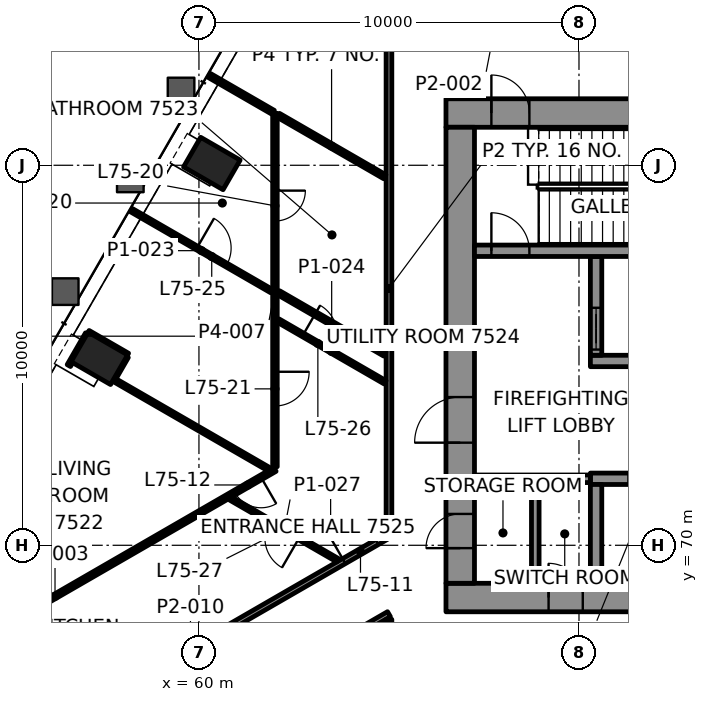
"""IFC4 building model, lengths in metres.
Left out: names, types, materials, properties, quantities, classifications, styles, units other than length and angle.
Written with IfcOpenShell. Run it as: python <this file> out.ifc"""

import sys

from ifc_helpers import new_model, si_unit, direction, frame, frame_2d, origin, origin_2d, place, context, subcontext, project, spatial, rectangle, hollow_rectangle, extrude, element, fill, save


model = new_model("IFC4")
c1 = context("Model", 3, precision=1e-05, world=origin(), true_north=direction((0.0, 1.0)))
c2 = subcontext(c1, "Body", "Model", "MODEL_VIEW")
j1 = project(units=[si_unit("LENGTHUNIT", "METRE"), si_unit("PLANEANGLEUNIT", "RADIAN")], contexts=[c1])
p1 = place(None, origin())
s1 = spatial("IfcSite", under=j1, at=p1, CompositionType="ELEMENT")
p2 = place(p1, origin())
s2 = spatial("IfcBuilding", under=s1, at=p2, CompositionType="ELEMENT")
p3 = place(p2, frame((0.0, 0.0, 309.1)))
s3 = spatial("IfcBuildingStorey", under=s2, at=p3, CompositionType="ELEMENT", Elevation=309.1)
for number, where, z_axis, x_axis in (
    (1, (60.339, 80.046, -0.0), (0.0, 0.0, 1.0), (-0.5, -0.866, 0.0)),
    (2, (57.379, 74.919, -0.0), (0.0, 0.0, 1.0), (-0.5, -0.866, 0.0)),
):
    element("IfcColumn", number, at=place(p3, frame(where, z_axis=z_axis, x_axis=x_axis)), inside=s3, PredefinedType="COLUMN", context=c2, shape_type="SweptSolid", body=[
        extrude(hollow_rectangle(XDim=0.9, YDim=1.2, WallThickness=0.06, at=origin_2d()), origin(), (0.0, 0.0, 1.0), 3.5),
    ])
p4 = place(p3, frame((66.5, 68.625, 0.0), z_axis=(0.0, 0.0, 1.0), x_axis=(1.0, 0.0, 0.0)))
e3 = element("IfcWall", 3, at=p4, inside=s3, PredefinedType="SHEAR", context=c2, shape_type="SweptSolid", body=[
    extrude(rectangle(XDim=17.0, YDim=0.75, at=frame_2d((8.5, 0.0))), origin(), (0.0, 0.0, 1.0), 3.3),
])
p5 = place(p4, frame((2.7, 0.0, 0.0)))
e4 = element("IfcOpeningElement", 4, at=p5, cuts=e3, PredefinedType="OPENING", context=c2, shape_type="SweptSolid", body=[
    extrude(rectangle(XDim=0.9, YDim=2.1, at=frame_2d((0.45, 1.05))), frame((0.0, 0.385, 0.0), z_axis=(0.0, -1.0, 0.0), x_axis=(1.0, 0.0, 0.0)), (0.0, 0.0, 1.0), 0.77),
])
p6 = place(p3, frame((66.5, 81.375, 0.0), z_axis=(0.0, 0.0, 1.0), x_axis=(1.0, 0.0, 0.0)))
e5 = element("IfcWall", 5, at=p6, inside=s3, PredefinedType="SHEAR", context=c2, shape_type="SweptSolid", body=[
    extrude(rectangle(XDim=17.0, YDim=0.75, at=frame_2d((8.5, 0.0))), origin(), (0.0, 0.0, 1.0), 3.3),
])
p7 = place(p6, frame((1.195, 0.0, 0.0)))
e6 = element("IfcOpeningElement", 6, at=p7, cuts=e5, PredefinedType="OPENING", context=c2, shape_type="SweptSolid", body=[
    extrude(rectangle(XDim=1.0, YDim=2.1, at=frame_2d((0.5, 1.05))), frame((0.0, 0.385, 0.0), z_axis=(0.0, -1.0, 0.0), x_axis=(1.0, 0.0, 0.0)), (0.0, 0.0, 1.0), 0.77),
])
p8 = place(p6, frame((15.005, 0.0, 0.0)))
e7 = element("IfcOpeningElement", 7, at=p8, cuts=e5, PredefinedType="OPENING", context=c2, shape_type="SweptSolid", body=[
    extrude(rectangle(XDim=1.0, YDim=2.1, at=frame_2d((0.5, 1.05))), frame((0.0, 0.385, 0.0), z_axis=(0.0, -1.0, 0.0), x_axis=(1.0, 0.0, 0.0)), (0.0, 0.0, 1.0), 0.77),
])
p9 = place(p6, frame((8.15, 0.0, 0.0)))
e8 = element("IfcOpeningElement", 8, at=p9, cuts=e5, PredefinedType="OPENING", context=c2, shape_type="SweptSolid", body=[
    extrude(rectangle(XDim=0.9, YDim=2.1, at=frame_2d((0.45, 1.05))), frame((0.0, 0.385, 0.0), z_axis=(0.0, -1.0, 0.0), x_axis=(1.0, 0.0, 0.0)), (0.0, 0.0, 1.0), 0.77),
])
p10 = place(p3, frame((66.875, 69.0, 0.0), z_axis=(0.0, 0.0, 1.0), x_axis=(0.0, 1.0, 0.0)))
e9 = element("IfcWall", 9, at=p10, inside=s3, PredefinedType="SHEAR", context=c2, shape_type="SweptSolid", body=[
    extrude(rectangle(XDim=12.0, YDim=0.75, at=frame_2d((6.0, 0.0))), origin(), (0.0, 0.0, 1.0), 3.3),
])
p11 = place(p10, frame((3.7, 0.0, 0.0)))
e10 = element("IfcOpeningElement", 10, at=p11, cuts=e9, PredefinedType="OPENING", context=c2, shape_type="SweptSolid", body=[
    extrude(rectangle(XDim=1.2, YDim=2.1, at=frame_2d((0.6, 1.05))), frame((0.0, 0.385, 0.0), z_axis=(0.0, -1.0, 0.0), x_axis=(1.0, 0.0, 0.0)), (0.0, 0.0, 1.0), 0.77),
])
p12 = place(p10, frame((0.925, 0.0, 0.0)))
e11 = element("IfcOpeningElement", 11, at=p12, cuts=e9, PredefinedType="OPENING", context=c2, shape_type="SweptSolid", body=[
    extrude(rectangle(XDim=0.9, YDim=2.1, at=frame_2d((0.45, 1.05))), frame((0.0, 0.385, 0.0), z_axis=(0.0, -1.0, 0.0), x_axis=(1.0, 0.0, 0.0)), (0.0, 0.0, 1.0), 0.77),
])
p13 = place(p3, frame((70.3, 71.75, 0.0), z_axis=(0.0, 0.0, 1.0), x_axis=(1.0, 0.0, 0.0)))
e12 = element("IfcWall", 12, at=p13, inside=s3, PredefinedType="SHEAR", context=c2, shape_type="SweptSolid", body=[
    extrude(rectangle(XDim=11.5, YDim=0.3, at=frame_2d((5.75, 0.0))), origin(), (0.0, 0.0, 1.0), 3.3),
])
p14 = place(p13, frame((1.0, 0.0, 0.0)))
e13 = element("IfcOpeningElement", 13, at=p14, cuts=e12, PredefinedType="OPENING", context=c2, shape_type="SweptSolid", body=[
    extrude(rectangle(XDim=1.1, YDim=2.1, at=frame_2d((0.55, 1.05))), frame((0.0, 0.16, 0.0), z_axis=(0.0, -1.0, 0.0), x_axis=(1.0, 0.0, 0.0)), (0.0, 0.0, 1.0), 0.32),
])
p15 = place(p13, frame((3.8, 0.0, 0.0)))
e14 = element("IfcOpeningElement", 14, at=p15, cuts=e12, PredefinedType="OPENING", context=c2, shape_type="SweptSolid", body=[
    extrude(rectangle(XDim=1.1, YDim=2.1, at=frame_2d((0.55, 1.05))), frame((0.0, 0.16, 0.0), z_axis=(0.0, -1.0, 0.0), x_axis=(1.0, 0.0, 0.0)), (0.0, 0.0, 1.0), 0.32),
])
p16 = place(p13, frame((6.6, 0.0, 0.0)))
e15 = element("IfcOpeningElement", 15, at=p16, cuts=e12, PredefinedType="OPENING", context=c2, shape_type="SweptSolid", body=[
    extrude(rectangle(XDim=1.1, YDim=2.1, at=frame_2d((0.55, 1.05))), frame((0.0, 0.16, 0.0), z_axis=(0.0, -1.0, 0.0), x_axis=(1.0, 0.0, 0.0)), (0.0, 0.0, 1.0), 0.32),
])
p17 = place(p13, frame((9.4, 0.0, 0.0)))
e16 = element("IfcOpeningElement", 16, at=p17, cuts=e12, PredefinedType="OPENING", context=c2, shape_type="SweptSolid", body=[
    extrude(rectangle(XDim=1.1, YDim=2.1, at=frame_2d((0.55, 1.05))), frame((0.0, 0.16, 0.0), z_axis=(0.0, -1.0, 0.0), x_axis=(1.0, 0.0, 0.0)), (0.0, 0.0, 1.0), 0.32),
])
p18 = place(p3, frame((70.3, 74.85, 0.0), z_axis=(0.0, 0.0, 1.0), x_axis=(1.0, 0.0, 0.0)))
e17 = element("IfcWall", 17, at=p18, inside=s3, PredefinedType="SHEAR", context=c2, shape_type="SweptSolid", body=[
    extrude(rectangle(XDim=5.9, YDim=0.3, at=frame_2d((2.95, 0.0))), origin(), (0.0, 0.0, 1.0), 3.3),
])
p19 = place(p18, frame((3.8, 0.0, 0.0)))
e18 = element("IfcOpeningElement", 18, at=p19, cuts=e17, PredefinedType="OPENING", context=c2, shape_type="SweptSolid", body=[
    extrude(rectangle(XDim=1.1, YDim=2.1, at=frame_2d((0.55, 1.05))), frame((0.0, 0.16, 0.0), z_axis=(0.0, -1.0, 0.0), x_axis=(1.0, 0.0, 0.0)), (0.0, 0.0, 1.0), 0.32),
])
p20 = place(p3, frame((70.45, 69.0, 0.0), z_axis=(0.0, 0.0, 1.0), x_axis=(0.0, 1.0, 0.0)))
e19 = element("IfcWall", 19, at=p20, inside=s3, PredefinedType="SHEAR", context=c2, shape_type="SweptSolid", body=[
    extrude(rectangle(XDim=2.6, YDim=0.3, at=frame_2d((1.3, 0.0))), origin(), (0.0, 0.0, 1.0), 3.3),
])
p21 = place(p3, frame((70.45, 75.0, 0.0), z_axis=(0.0, 0.0, 1.0), x_axis=(0.0, 1.0, 0.0)))
e20 = element("IfcWall", 20, at=p21, inside=s3, PredefinedType="SHEAR", context=c2, shape_type="SweptSolid", body=[
    extrude(rectangle(XDim=2.6, YDim=0.3, at=frame_2d((1.3, 0.0))), origin(), (0.0, 0.0, 1.0), 3.3),
])
p22 = place(p21, frame((0.15, 0.0, 0.0)))
e21 = element("IfcOpeningElement", 21, at=p22, cuts=e20, PredefinedType="OPENING", context=c2, shape_type="SweptSolid", body=[
    extrude(rectangle(XDim=1.1, YDim=2.1, at=frame_2d((0.55, 1.05))), frame((0.0, 0.16, 0.0), z_axis=(0.0, -1.0, 0.0), x_axis=(1.0, 0.0, 0.0)), (0.0, 0.0, 1.0), 0.32),
])
p23 = place(p3, frame((67.25, 77.75, 0.0), z_axis=(0.0, 0.0, 1.0), x_axis=(1.0, 0.0, 0.0)))
e22 = element("IfcWall", 22, at=p23, inside=s3, PredefinedType="SHEAR", context=c2, shape_type="SweptSolid", body=[
    extrude(rectangle(XDim=15.5, YDim=0.3, at=frame_2d((7.75, 0.0))), origin(), (0.0, 0.0, 1.0), 3.3),
])
p24 = place(p23, frame((0.445, 0.0, 0.0)))
e23 = element("IfcOpeningElement", 23, at=p24, cuts=e22, PredefinedType="OPENING", context=c2, shape_type="SweptSolid", body=[
    extrude(rectangle(XDim=1.0, YDim=2.1, at=frame_2d((0.5, 1.05))), frame((0.0, 0.16, 0.0), z_axis=(0.0, -1.0, 0.0), x_axis=(1.0, 0.0, 0.0)), (0.0, 0.0, 1.0), 0.32),
])
p25 = place(p3, frame((65.0, 68.187, 0.0), z_axis=(0.0, 0.0, 1.0), x_axis=(-0.866028339337, -0.499994915439, 0.0)))
e24 = element("IfcWall", 24, at=p25, inside=s3, PredefinedType="PARTITIONING", context=c2, shape_type="SweptSolid", body=[
    extrude(rectangle(XDim=10.937, YDim=0.15, at=frame_2d((5.468, 0.0))), origin(), (0.0, 0.0, 1.0), 2.697),
])
p26 = place(p25, frame((6.943, 0.0, 0.0)))
e25 = element("IfcOpeningElement", 25, at=p26, cuts=e24, PredefinedType="OPENING", context=c2, shape_type="SweptSolid", body=[
    extrude(rectangle(XDim=1.0, YDim=2.1, at=frame_2d((0.5, 1.05))), frame((0.0, 0.085, 0.0), z_axis=(0.0, -1.0, 0.0), x_axis=(1.0, 0.0, 0.0)), (0.0, 0.0, 1.0), 0.17),
])
p27 = place(p3, frame((54.628, 64.278, 0.0), z_axis=(0.0, 0.0, 1.0), x_axis=(0.866033426221, 0.499986104476, 0.0)))
e26 = element("IfcWall", 26, at=p27, inside=s3, PredefinedType="PARTITIONING", context=c2, shape_type="SweptSolid", body=[
    extrude(rectangle(XDim=11.89, YDim=0.15, at=frame_2d((5.945, 0.0))), origin(), (0.0, 0.0, 1.0), 2.7),
])
p28 = place(p27, frame((10.612, 0.0, 0.0)))
e27 = element("IfcOpeningElement", 27, at=p28, cuts=e26, PredefinedType="OPENING", context=c2, shape_type="SweptSolid", body=[
    extrude(rectangle(XDim=1.0, YDim=2.1, at=frame_2d((0.5, 1.05))), frame((0.0, 0.085, 0.0), z_axis=(0.0, -1.0, 0.0), x_axis=(1.0, 0.0, 0.0)), (0.0, 0.0, 1.0), 0.17),
])
p29 = place(p3, frame((62.0, 71.998, 0.0), z_axis=(0.0, 0.0, 1.0), x_axis=(-0.866025574339, -0.499999704591, 0.0)))
e28 = element("IfcWall", 28, at=p29, inside=s3, PredefinedType="PARTITIONING", context=c2, shape_type="SweptSolid", body=[
    extrude(rectangle(XDim=13.365, YDim=0.12, at=frame_2d((6.682, 0.0))), origin(), (0.0, 0.0, 1.0), 2.7),
])
p30 = place(p29, frame((0.421, 0.0, 0.0)))
e29 = element("IfcOpeningElement", 29, at=p30, cuts=e28, PredefinedType="OPENING", context=c2, shape_type="SweptSolid", body=[
    extrude(rectangle(XDim=0.8, YDim=2.1, at=frame_2d((0.4, 1.05))), frame((0.0, 0.07, 0.0), z_axis=(0.0, -1.0, 0.0), x_axis=(1.0, 0.0, 0.0)), (0.0, 0.0, 1.0), 0.14),
])
p31 = place(p29, frame((10.158, 0.0, 0.0)))
e30 = element("IfcOpeningElement", 30, at=p31, cuts=e28, PredefinedType="OPENING", context=c2, shape_type="SweptSolid", body=[
    extrude(rectangle(XDim=0.8, YDim=2.1, at=frame_2d((0.4, 1.05))), frame((0.0, 0.07, 0.0), z_axis=(0.0, -1.0, 0.0), x_axis=(1.0, 0.0, 0.0)), (0.0, 0.0, 1.0), 0.14),
])
p32 = place(p3, frame((57.776, 74.406, 0.0), z_axis=(0.0, 0.0, 1.0), x_axis=(0.500246099629, 0.865883271467, 0.0)))
e31 = element("IfcWall", 31, at=p32, inside=s3, PredefinedType="PARTITIONING", context=c2, shape_type="SweptSolid", body=[
    extrude(rectangle(XDim=0.646, YDim=0.1, at=frame_2d((0.323, 0.0))), origin(), (0.0, 0.0, 1.0), 2.7),
])
p33 = place(p3, frame((56.576, 74.729, 0.0), z_axis=(0.0, 0.0, 1.0), x_axis=(0.500079715141, 0.865979375335, 0.0)))
e32 = element("IfcWall", 32, at=p33, inside=s3, PredefinedType="PARTITIONING", context=c2, shape_type="SweptSolid", body=[
    extrude(rectangle(XDim=0.966, YDim=0.1, at=frame_2d((0.483, 0.0))), origin(), (0.0, 0.0, 1.0), 2.7),
])
p34 = place(p3, frame((65.0, 66.825, 0.0), z_axis=(0.0, 0.0, 1.0), x_axis=(0.0, 1.0, 0.0)))
e33 = element("IfcWall", 33, at=p34, inside=s3, PredefinedType="PARTITIONING", context=c2, shape_type="SweptSolid", body=[
    extrude(rectangle(XDim=1.226, YDim=0.15, at=frame_2d((0.613, 0.0))), origin(), (0.0, 0.0, 1.0), 2.697),
])
p35 = place(p3, frame((65.0, 70.266, 0.0), z_axis=(0.0, 0.0, 1.0), x_axis=(0.0, 1.0, 0.0)))
e34 = element("IfcWall", 34, at=p35, inside=s3, PredefinedType="PARTITIONING", context=c2, shape_type="SweptSolid", body=[
    extrude(rectangle(XDim=12.984, YDim=0.15, at=frame_2d((6.492, 0.0))), origin(), (0.0, 0.0, 1.0), 2.7),
])
p36 = place(p3, frame((62.0, 81.366, 0.0), z_axis=(0.0, 0.0, 1.0), x_axis=(0.0, -1.0, 0.0)))
e35 = element("IfcWall", 35, at=p36, inside=s3, PredefinedType="PARTITIONING", context=c2, shape_type="SweptSolid", body=[
    extrude(rectangle(XDim=9.299, YDim=0.12, at=frame_2d((4.649, 0.0))), origin(), (0.0, 0.0, 1.0), 2.7),
])
p37 = place(p36, frame((2.033, 0.0, 0.0)))
e36 = element("IfcOpeningElement", 36, at=p37, cuts=e35, PredefinedType="OPENING", context=c2, shape_type="SweptSolid", body=[
    extrude(rectangle(XDim=0.8, YDim=2.1, at=frame_2d((0.4, 1.05))), frame((0.0, 0.07, 0.0), z_axis=(0.0, -1.0, 0.0), x_axis=(1.0, 0.0, 0.0)), (0.0, 0.0, 1.0), 0.14),
])
p38 = place(p36, frame((6.8, 0.0, 0.0)))
e37 = element("IfcOpeningElement", 37, at=p38, cuts=e35, PredefinedType="OPENING", context=c2, shape_type="SweptSolid", body=[
    extrude(rectangle(XDim=0.9, YDim=2.1, at=frame_2d((0.45, 1.05))), frame((0.0, 0.07, 0.0), z_axis=(0.0, -1.0, 0.0), x_axis=(1.0, 0.0, 0.0)), (0.0, 0.0, 1.0), 0.14),
])
p39 = place(p3, frame((64.89, 79.697, 0.0), z_axis=(0.0, 0.0, 1.0), x_axis=(-0.866013313631, 0.500020940175, 0.0)))
e38 = element("IfcWall", 38, at=p39, inside=s3, PredefinedType="PARTITIONING", context=c2, shape_type="SweptSolid", body=[
    extrude(rectangle(XDim=3.233, YDim=0.12, at=frame_2d((1.617, 0.0))), origin(), (0.0, 0.0, 1.0), 2.7),
])
p40 = place(p3, frame((64.89, 75.031, 0.0), z_axis=(0.0, 0.0, 1.0), x_axis=(-0.866033195618, 0.499986503906, 0.0)))
e39 = element("IfcWall", 39, at=p40, inside=s3, PredefinedType="PARTITIONING", context=c2, shape_type="SweptSolid", body=[
    extrude(rectangle(XDim=3.228, YDim=0.12, at=frame_2d((1.614, 0.0))), origin(), (0.0, 0.0, 1.0), 2.7),
])
p41 = place(p3, frame((58.222, 78.819, 0.0), z_axis=(0.0, 0.0, 1.0), x_axis=(0.866017735387, -0.500013281819, 0.0)))
e40 = element("IfcWall", 40, at=p41, inside=s3, PredefinedType="PARTITIONING", context=c2, shape_type="SweptSolid", body=[
    extrude(rectangle(XDim=4.263, YDim=0.1, at=frame_2d((2.132, 0.0))), origin(), (0.0, 0.0, 1.0), 2.688),
])
p42 = place(p41, frame((1.991, 0.0, 0.0)))
e41 = element("IfcOpeningElement", 41, at=p42, cuts=e40, PredefinedType="OPENING", context=c2, shape_type="SweptSolid", body=[
    extrude(rectangle(XDim=0.9, YDim=2.1, at=frame_2d((0.45, 1.05))), frame((0.0, 0.06, 0.0), z_axis=(0.0, -1.0, 0.0), x_axis=(1.0, 0.0, 0.0)), (0.0, 0.0, 1.0), 0.12),
])
p43 = place(p3, frame((62.086, 75.912, 0.0), z_axis=(0.0, 0.0, 1.0), x_axis=(0.866032882975, -0.499987045439, 0.0)))
e42 = element("IfcWall", 42, at=p43, inside=s3, PredefinedType="PARTITIONING", context=c2, shape_type="SweptSolid", body=[
    extrude(rectangle(XDim=3.248, YDim=0.1, at=frame_2d((1.624, 0.0))), origin(), (0.0, 0.0, 1.0), 2.7),
])
p44 = place(p43, frame((0.754, 0.0, 0.0)))
e43 = element("IfcOpeningElement", 43, at=p44, cuts=e42, PredefinedType="OPENING", context=c2, shape_type="SweptSolid", body=[
    extrude(rectangle(XDim=0.9, YDim=2.1, at=frame_2d((0.45, 1.05))), frame((0.0, 0.06, 0.0), z_axis=(0.0, -1.0, 0.0), x_axis=(1.0, 0.0, 0.0)), (0.0, 0.0, 1.0), 0.12),
])
p45 = place(p3, frame((58.124, 75.01, 0.0), z_axis=(0.0, 0.0, 1.0), x_axis=(-0.865978732077, 0.500080829057, 0.0)))
e44 = element("IfcWall", 44, at=p45, inside=s3, PredefinedType="PARTITIONING", context=c2, shape_type="SweptSolid", body=[
    extrude(rectangle(XDim=1.199, YDim=0.1, at=frame_2d((0.6, 0.0))), origin(), (0.0, 0.0, 1.0), 2.688),
])
p46 = place(p3, frame((61.837, 72.003, 0.0), z_axis=(0.0, 0.0, 1.0), x_axis=(-0.86602790099, 0.499995674689, 0.0)))
e45 = element("IfcWall", 45, at=p46, inside=s3, PredefinedType="PARTITIONING", context=c2, shape_type="SweptSolid", body=[
    extrude(rectangle(XDim=4.718, YDim=0.1, at=frame_2d((2.359, 0.0))), origin(), (0.0, 0.0, 1.0), 2.7),
])
p47 = place(p3, frame((63.652, 69.604, 0.0), z_axis=(0.0, 0.0, 1.0), x_axis=(-0.866032882975, 0.499987045439, 0.0)))
e46 = element("IfcWall", 46, at=p47, inside=s3, PredefinedType="PARTITIONING", context=c2, shape_type="SweptSolid", body=[
    extrude(rectangle(XDim=3.248, YDim=0.1, at=frame_2d((1.624, 0.0))), origin(), (0.0, 0.0, 1.0), 2.7),
])
p48 = place(p47, frame((1.174, 0.0, 0.0)))
e47 = element("IfcOpeningElement", 47, at=p48, cuts=e46, PredefinedType="OPENING", context=c2, shape_type="SweptSolid", body=[
    extrude(rectangle(XDim=0.9, YDim=2.1, at=frame_2d((0.45, 1.05))), frame((0.0, 0.06, 0.0), z_axis=(0.0, -1.0, 0.0), x_axis=(1.0, 0.0, 0.0)), (0.0, 0.0, 1.0), 0.12),
])
p49 = place(p3, frame((61.955, 81.392, 0.0), z_axis=(0.0, 0.0, 1.0), x_axis=(-0.865995465643, 0.500051850797, 0.0)))
e48 = element("IfcWall", 48, at=p49, inside=s3, PredefinedType="PARTITIONING", context=c2, shape_type="SweptSolid", body=[
    extrude(rectangle(XDim=1.946, YDim=0.12, at=frame_2d((0.973, 0.0))), origin(), (0.0, 0.0, 1.0), 2.688),
])
p50 = place(p3, frame((67.25, 71.75, 0.0), z_axis=(0.0, 0.0, 1.0), x_axis=(1.0, 0.0, 0.0)))
e49 = element("IfcWall", 49, at=p50, inside=s3, PredefinedType="PARTITIONING", context=c2, shape_type="SweptSolid", body=[
    extrude(rectangle(XDim=3.05, YDim=0.2, at=frame_2d((1.525, 0.0))), origin(), (0.0, 0.0, 1.0), 3.3),
])
p51 = place(p3, frame((68.85, 69.0, 0.0), z_axis=(0.0, 0.0, 1.0), x_axis=(0.0, 1.0, 0.0)))
e50 = element("IfcWall", 50, at=p51, inside=s3, PredefinedType="PARTITIONING", context=c2, shape_type="SweptSolid", body=[
    extrude(rectangle(XDim=2.65, YDim=0.2, at=frame_2d((1.325, 0.0))), origin(), (0.0, 0.0, 1.0), 3.3),
])
p52 = place(p28, origin())
e51 = element("IfcDoor", 51, at=p52, inside=s3, OperationType="SINGLE_SWING_RIGHT", PredefinedType="DOOR", context=c2, shape_type="SweptSolid", body=[
    extrude(rectangle(XDim=1.0, YDim=2.1, at=frame_2d((0.5, 1.05))), frame((0.0, 0.025, 0.0), z_axis=(0.0, -1.0, 0.0), x_axis=(1.0, 0.0, 0.0)), (0.0, 0.0, 1.0), 0.05),
])
fill(e27, e51)
p53 = place(p30, origin())
e52 = element("IfcDoor", 52, at=p53, inside=s3, OperationType="SINGLE_SWING_RIGHT", PredefinedType="DOOR", context=c2, shape_type="SweptSolid", body=[
    extrude(rectangle(XDim=0.8, YDim=2.1, at=frame_2d((0.4, 1.05))), frame((0.0, 0.025, 0.0), z_axis=(0.0, -1.0, 0.0), x_axis=(1.0, 0.0, 0.0)), (0.0, 0.0, 1.0), 0.05),
])
fill(e29, e52)
p54 = place(p37, origin())
e53 = element("IfcDoor", 53, at=p54, inside=s3, OperationType="SINGLE_SWING_RIGHT", PredefinedType="DOOR", context=c2, shape_type="SweptSolid", body=[
    extrude(rectangle(XDim=0.8, YDim=2.1, at=frame_2d((0.4, 1.05))), frame((0.0, 0.025, 0.0), z_axis=(0.0, -1.0, 0.0), x_axis=(1.0, 0.0, 0.0)), (0.0, 0.0, 1.0), 0.05),
])
fill(e36, e53)
p55 = place(p38, origin())
e54 = element("IfcDoor", 54, at=p55, inside=s3, OperationType="SINGLE_SWING_RIGHT", PredefinedType="DOOR", context=c2, shape_type="SweptSolid", body=[
    extrude(rectangle(XDim=0.9, YDim=2.1, at=frame_2d((0.45, 1.05))), frame((0.0, 0.025, 0.0), z_axis=(0.0, -1.0, 0.0), x_axis=(1.0, 0.0, 0.0)), (0.0, 0.0, 1.0), 0.05),
])
fill(e37, e54)
p56 = place(p42, origin())
e55 = element("IfcDoor", 55, at=p56, inside=s3, OperationType="SINGLE_SWING_LEFT", PredefinedType="DOOR", context=c2, shape_type="SweptSolid", body=[
    extrude(rectangle(XDim=0.9, YDim=2.1, at=frame_2d((0.45, 1.05))), frame((0.0, 0.025, 0.0), z_axis=(0.0, -1.0, 0.0), x_axis=(1.0, 0.0, 0.0)), (0.0, 0.0, 1.0), 0.05),
])
fill(e41, e55)
p57 = place(p44, origin())
e56 = element("IfcDoor", 56, at=p57, inside=s3, OperationType="SINGLE_SWING_LEFT", PredefinedType="DOOR", context=c2, shape_type="SweptSolid", body=[
    extrude(rectangle(XDim=0.9, YDim=2.1, at=frame_2d((0.45, 1.05))), frame((0.0, 0.025, 0.0), z_axis=(0.0, -1.0, 0.0), x_axis=(1.0, 0.0, 0.0)), (0.0, 0.0, 1.0), 0.05),
])
fill(e43, e56)
p58 = place(p48, origin())
e57 = element("IfcDoor", 57, at=p58, inside=s3, OperationType="SINGLE_SWING_RIGHT", PredefinedType="DOOR", context=c2, shape_type="SweptSolid", body=[
    extrude(rectangle(XDim=0.9, YDim=2.1, at=frame_2d((0.45, 1.05))), frame((0.0, 0.025, 0.0), z_axis=(0.0, -1.0, 0.0), x_axis=(1.0, 0.0, 0.0)), (0.0, 0.0, 1.0), 0.05),
])
fill(e47, e57)
p59 = place(p22, origin())
e58 = element("IfcDoor", 58, at=p59, inside=s3, OperationType="DOUBLE_DOOR_SLIDING", PredefinedType="DOOR", context=c2, shape_type="SweptSolid", body=[
    extrude(rectangle(XDim=1.1, YDim=2.1, at=frame_2d((0.55, 1.05))), frame((0.0, 0.025, 0.0), z_axis=(0.0, -1.0, 0.0), x_axis=(1.0, 0.0, 0.0)), (0.0, 0.0, 1.0), 0.05),
])
fill(e21, e58)
p60 = place(p24, origin())
e59 = element("IfcDoor", 59, at=p60, inside=s3, OperationType="SINGLE_SWING_LEFT", PredefinedType="DOOR", context=c2, shape_type="SweptSolid", body=[
    extrude(rectangle(XDim=1.0, YDim=2.1, at=frame_2d((0.5, 1.05))), frame((0.0, 0.025, 0.0), z_axis=(0.0, -1.0, 0.0), x_axis=(1.0, 0.0, 0.0)), (0.0, 0.0, 1.0), 0.05),
])
fill(e23, e59)
p61 = place(p7, origin())
e60 = element("IfcDoor", 60, at=p61, inside=s3, OperationType="SINGLE_SWING_RIGHT", PredefinedType="DOOR", context=c2, shape_type="SweptSolid", body=[
    extrude(rectangle(XDim=1.0, YDim=2.1, at=frame_2d((0.5, 1.05))), frame((0.0, 0.095, 0.0), z_axis=(0.0, -1.0, 0.0), x_axis=(1.0, 0.0, 0.0)), (0.0, 0.0, 1.0), 0.19),
])
fill(e6, e60)
p62 = place(p11, origin())
e61 = element("IfcDoor", 61, at=p62, inside=s3, OperationType="SINGLE_SWING_RIGHT", PredefinedType="DOOR", context=c2, shape_type="SweptSolid", body=[
    extrude(rectangle(XDim=1.2, YDim=2.1, at=frame_2d((0.6, 1.05))), frame((0.0, 0.095, 0.0), z_axis=(0.0, -1.0, 0.0), x_axis=(1.0, 0.0, 0.0)), (0.0, 0.0, 1.0), 0.19),
])
fill(e10, e61)
p63 = place(p12, origin())
e62 = element("IfcDoor", 62, at=p63, inside=s3, OperationType="SINGLE_SWING_RIGHT", PredefinedType="DOOR", context=c2, shape_type="SweptSolid", body=[
    extrude(rectangle(XDim=0.9, YDim=2.1, at=frame_2d((0.45, 1.05))), frame((0.0, 0.095, 0.0), z_axis=(0.0, -1.0, 0.0), x_axis=(1.0, 0.0, 0.0)), (0.0, 0.0, 1.0), 0.19),
])
fill(e11, e62)
p64 = place(p5, origin())
e63 = element("IfcDoor", 63, at=p64, inside=s3, OperationType="SINGLE_SWING_LEFT", PredefinedType="DOOR", context=c2, shape_type="SweptSolid", body=[
    extrude(rectangle(XDim=0.9, YDim=2.1, at=frame_2d((0.45, 1.05))), frame((0.0, 0.095, 0.0), z_axis=(0.0, -1.0, 0.0), x_axis=(1.0, 0.0, 0.0)), (0.0, 0.0, 1.0), 0.19),
])
fill(e4, e63)
save(model, sys.argv[1])
